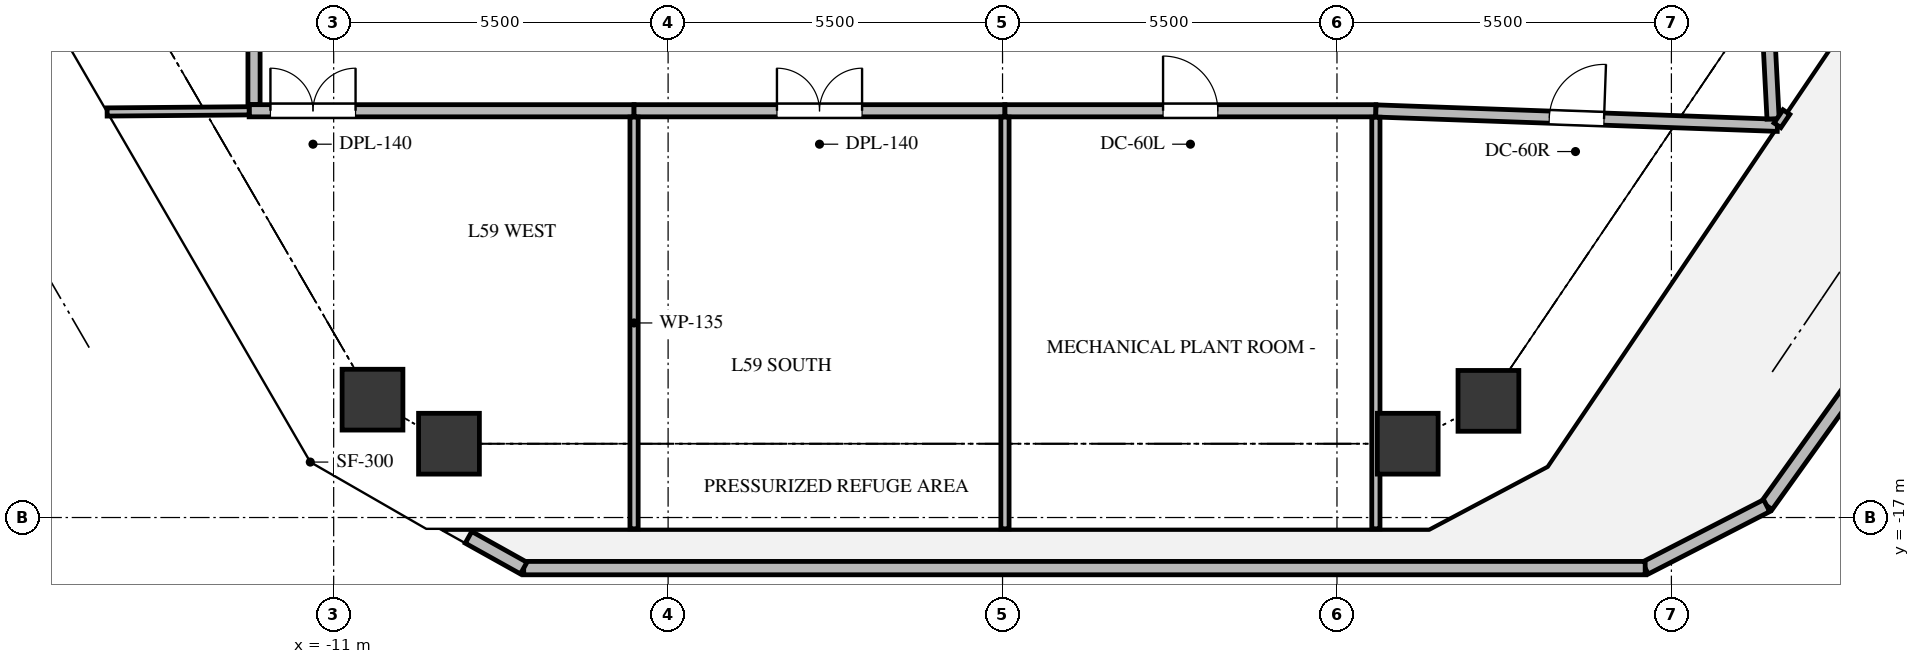
"""IFC4 building model, lengths in metres.
Left out: names, types, materials, properties, quantities, classifications, styles, units other than length and angle.
Written with IfcOpenShell. Run it as: python <this file> out.ifc"""

import sys

from ifc_helpers import new_model, si_unit, direction, frame, frame_2d, origin, origin_2d, place, context, subcontext, project, spatial, rectangle, extrude, source, transform, mapped, element, fill, save


model = new_model("IFC4")
c1 = context("Model", 3, precision=1e-05, world=origin(), true_north=direction((0.0, 1.0)))
c2 = subcontext(c1, "Body", "Model", "MODEL_VIEW")
j1 = project(units=[si_unit("LENGTHUNIT", "METRE"), si_unit("PLANEANGLEUNIT", "RADIAN")], contexts=[c1])
p1 = place(None, origin())
s1 = spatial("IfcSite", under=j1, at=p1, CompositionType="ELEMENT")
p2 = place(p1, origin())
s2 = spatial("IfcBuilding", under=s1, at=p2, CompositionType="ELEMENT")
p3 = place(p2, frame((0.0, 0.0, 213.4)))
s3 = spatial("IfcBuildingStorey", under=s2, at=p3, CompositionType="ELEMENT", Elevation=213.4)
m1 = source(origin(), c2, "Body", "SweptSolid", [
    extrude(rectangle(XDim=1.0, YDim=1.0, at=origin_2d()), origin(), (0.0, 0.0, 1.0), 4.96),
])
for number, where, z_axis, x_axis in (
    (1, (-10.361, -15.062, -0.3), (0.0, 0.0, 1.0), (1.0, 0.0, 0.0)),
    (2, (7.991, -15.081, -0.3), (0.0, 0.0, 1.0), (1.0, 0.0, 0.0)),
    (3, (6.664, -15.786, -0.3), (0.0, 0.0, 1.0), (1.0, 0.0, 0.0)),
    (4, (-9.104, -15.786, -0.3), (0.0, 0.0, 1.0), (1.0, 0.0, 0.0)),
):
    element("IfcColumn", number, at=place(p3, frame(where, z_axis=z_axis, x_axis=x_axis)), inside=s3, PredefinedType="COLUMN", context=c2, shape_type="MappedRepresentation", body=[
        mapped(m1, transform((0.0, 0.0, 0.0), x_axis=(1.0, 0.0, 0.0), y_axis=(0.0, 1.0, 0.0), z_axis=(0.0, 0.0, 1.0), scale=1.0)),
    ])
p4 = place(p3, frame((22.914, -2.353, 0.0), z_axis=(0.0, 0.0, 1.0), x_axis=(-0.582134397548, -0.813092579718, 0.0)))
e5 = element("IfcWall", 5, at=p4, inside=s3, PredefinedType="PARAPET", context=c2, shape_type="SweptSolid", body=[
    extrude(rectangle(XDim=17.774, YDim=0.22, at=frame_2d((8.887, 0.0))), origin(), (0.0, 0.0, 1.0), 1.2),
])
p5 = place(p3, frame((12.567, -16.805, 0.0), z_axis=(0.0, 0.0, 1.0), x_axis=(-0.889417810989, -0.457095129591, 0.0)))
e6 = element("IfcWall", 6, at=p5, inside=s3, PredefinedType="PARAPET", context=c2, shape_type="SweptSolid", body=[
    extrude(rectangle(XDim=2.247, YDim=0.22, at=frame_2d((1.124, 0.0))), origin(), (0.0, 0.0, 1.0), 1.2),
])
p6 = place(p3, frame((10.569, -17.832, 0.0), z_axis=(0.0, 0.0, 1.0), x_axis=(-1.0, 0.0, 0.0)))
e7 = element("IfcWall", 7, at=p6, inside=s3, PredefinedType="PARAPET", context=c2, shape_type="SweptSolid", body=[
    extrude(rectangle(XDim=18.443, YDim=0.22, at=frame_2d((9.222, 0.0))), origin(), (0.0, 0.0, 1.0), 1.2),
])
p7 = place(p3, frame((-7.875, -17.832, 0.0), z_axis=(0.0, 0.0, 1.0), x_axis=(-0.873358107893, 0.4870786542, 0.0)))
e8 = element("IfcWall", 8, at=p7, inside=s3, PredefinedType="PARAPET", context=c2, shape_type="SweptSolid", body=[
    extrude(rectangle(XDim=1.039, YDim=0.22, at=frame_2d((0.52, 0.0))), origin(), (0.0, 0.0, 1.0), 1.2),
])
p8 = place(p3, frame((-12.39, -10.31, 0.0), z_axis=(0.0, 0.0, 1.0), x_axis=(1.0, 0.0, 0.0)))
e9 = element("IfcWall", 9, at=p8, inside=s3, PredefinedType="SOLIDWALL", context=c2, shape_type="SweptSolid", body=[
    extrude(rectangle(XDim=6.33, YDim=0.2, at=frame_2d((3.165, 0.0))), origin(), (0.0, 0.0, 1.0), 4.645),
])
p9 = place(p8, frame((0.35, 0.0, 0.0)))
e10 = element("IfcOpeningElement", 10, at=p9, cuts=e9, PredefinedType="OPENING", context=c2, shape_type="SweptSolid", body=[
    extrude(rectangle(XDim=1.4, YDim=2.15, at=frame_2d((0.7, 1.075))), frame((0.0, 0.11, 0.0), z_axis=(0.0, -1.0, 0.0), x_axis=(1.0, 0.0, 0.0)), (0.0, 0.0, 1.0), 0.22),
])
p10 = place(p3, frame((-6.06, -10.31, 0.0), z_axis=(0.0, 0.0, 1.0), x_axis=(1.0, 0.0, 0.0)))
e11 = element("IfcWall", 11, at=p10, inside=s3, PredefinedType="SOLIDWALL", context=c2, shape_type="SweptSolid", body=[
    extrude(rectangle(XDim=6.1, YDim=0.2, at=frame_2d((3.05, 0.0))), origin(), (0.0, 0.0, 1.0), 3.901),
])
p11 = place(p10, frame((2.35, 0.0, 0.0)))
e12 = element("IfcOpeningElement", 12, at=p11, cuts=e11, PredefinedType="OPENING", context=c2, shape_type="SweptSolid", body=[
    extrude(rectangle(XDim=1.4, YDim=2.15, at=frame_2d((0.7, 1.075))), frame((0.0, 0.11, 0.0), z_axis=(0.0, -1.0, 0.0), x_axis=(1.0, 0.0, 0.0)), (0.0, 0.0, 1.0), 0.22),
])
p12 = place(p3, frame((0.04, -10.31, 0.0), z_axis=(0.0, 0.0, 1.0), x_axis=(1.0, 0.0, 0.0)))
e13 = element("IfcWall", 13, at=p12, inside=s3, PredefinedType="SOLIDWALL", context=c2, shape_type="SweptSolid", body=[
    extrude(rectangle(XDim=6.1, YDim=0.2, at=frame_2d((3.05, 0.0))), origin(), (0.0, 0.0, 1.0), 3.901),
])
p13 = place(p12, frame((2.6, 0.0, 0.0)))
e14 = element("IfcOpeningElement", 14, at=p13, cuts=e13, PredefinedType="OPENING", context=c2, shape_type="SweptSolid", body=[
    extrude(rectangle(XDim=0.9, YDim=2.05, at=frame_2d((0.45, 1.025))), frame((0.0, 0.11, 0.0), z_axis=(0.0, -1.0, 0.0), x_axis=(1.0, 0.0, 0.0)), (0.0, 0.0, 1.0), 0.22),
])
p14 = place(p3, frame((6.14, -10.313, 0.0), z_axis=(0.0, 0.0, 1.0), x_axis=(0.999359083983, -0.035796944861, 0.0)))
e15 = element("IfcWall", 15, at=p14, inside=s3, PredefinedType="SOLIDWALL", context=c2, shape_type="SweptSolid", body=[
    extrude(rectangle(XDim=6.609, YDim=0.2, at=frame_2d((3.304, 0.0))), origin(), (0.0, 0.0, 1.0), 3.999),
])
p15 = place(p14, frame((2.854, 0.0, 0.0)))
e16 = element("IfcOpeningElement", 16, at=p15, cuts=e15, PredefinedType="OPENING", context=c2, shape_type="SweptSolid", body=[
    extrude(rectangle(XDim=0.9, YDim=2.05, at=frame_2d((0.45, 1.025))), frame((0.0, 0.11, 0.0), z_axis=(0.0, -1.0, 0.0), x_axis=(1.0, 0.0, 0.0)), (0.0, 0.0, 1.0), 0.22),
])
p16 = place(p3, frame((12.672, -10.443, 0.0), z_axis=(0.0, 0.0, 1.0), x_axis=(-0.051412460162, 0.998677504974, 0.0)))
e17 = element("IfcWall", 17, at=p16, inside=s3, PredefinedType="SOLIDWALL", context=c2, shape_type="SweptSolid", body=[
    extrude(rectangle(XDim=7.042, YDim=0.2, at=frame_2d((3.521, 0.0))), origin(), (0.0, 0.0, 1.0), 3.999),
])
p17 = place(p16, frame((3.071, 0.0, 0.0)))
e18 = element("IfcOpeningElement", 18, at=p17, cuts=e17, PredefinedType="OPENING", context=c2, shape_type="SweptSolid", body=[
    extrude(rectangle(XDim=0.9, YDim=2.05, at=frame_2d((0.45, 1.025))), frame((0.0, 0.11, 0.0), z_axis=(0.0, -1.0, 0.0), x_axis=(1.0, 0.0, 0.0)), (0.0, 0.0, 1.0), 0.22),
])
p18 = place(p3, frame((-12.31, -3.41, 0.0), z_axis=(0.0, 0.0, 1.0), x_axis=(0.0, -1.0, 0.0)))
e19 = element("IfcWall", 19, at=p18, inside=s3, PredefinedType="SOLIDWALL", context=c2, shape_type="SweptSolid", body=[
    extrude(rectangle(XDim=6.796, YDim=0.2, at=frame_2d((3.398, 0.0))), origin(), (0.0, 0.0, 1.0), 4.645),
])
p19 = place(p18, frame((2.948, 0.0, 0.0)))
e20 = element("IfcOpeningElement", 20, at=p19, cuts=e19, PredefinedType="OPENING", context=c2, shape_type="SweptSolid", body=[
    extrude(rectangle(XDim=0.9, YDim=2.05, at=frame_2d((0.45, 1.025))), frame((0.0, 0.11, 0.0), z_axis=(0.0, -1.0, 0.0), x_axis=(1.0, 0.0, 0.0)), (0.0, 0.0, 1.0), 0.22),
])
p20 = place(p3, frame((-6.06, -10.414, 0.0), z_axis=(0.0, 0.0, 1.0), x_axis=(0.0, -1.0, 0.0)))
e21 = element("IfcWall", 21, at=p20, inside=s3, PredefinedType="PARTITIONING", context=c2, shape_type="SweptSolid", body=[
    extrude(rectangle(XDim=6.772, YDim=0.135, at=frame_2d((3.386, 0.0))), origin(), (0.0, 0.0, 1.0), 3.901),
])
p21 = place(p3, frame((-14.726, -10.33, 0.0), z_axis=(0.0, 0.0, 1.0), x_axis=(0.99996592241, 0.008255544766, 0.0)))
e22 = element("IfcWall", 22, at=p21, inside=s3, PredefinedType="PARTITIONING", context=c2, shape_type="SweptSolid", body=[
    extrude(rectangle(XDim=2.336, YDim=0.135, at=frame_2d((1.168, 0.0))), origin(), (0.0, 0.0, 1.0), 3.999),
])
p22 = place(p3, frame((0.04, -10.414, 0.0), z_axis=(0.0, 0.0, 1.0), x_axis=(0.0, -1.0, 0.0)))
e23 = element("IfcWall", 23, at=p22, inside=s3, PredefinedType="PARTITIONING", context=c2, shape_type="SweptSolid", body=[
    extrude(rectangle(XDim=6.772, YDim=0.135, at=frame_2d((3.386, 0.0))), origin(), (0.0, 0.0, 1.0), 3.999),
])
p23 = place(p3, frame((6.14, -10.417, 0.0), z_axis=(0.0, 0.0, 1.0), x_axis=(0.0, -1.0, 0.0)))
e24 = element("IfcWall", 24, at=p23, inside=s3, PredefinedType="PARTITIONING", context=c2, shape_type="SweptSolid", body=[
    extrude(rectangle(XDim=6.769, YDim=0.135, at=frame_2d((3.385, 0.0))), origin(), (0.0, 0.0, 1.0), 3.901),
])
p24 = place(p3, frame((12.744, -10.55, 0.0), z_axis=(0.0, 0.0, 1.0), x_axis=(0.56006489544, 0.828448738846, 0.0)))
e25 = element("IfcWall", 25, at=p24, inside=s3, PredefinedType="PARTITIONING", context=c2, shape_type="SweptSolid", body=[
    extrude(rectangle(XDim=0.262, YDim=0.135, at=frame_2d((0.131, 0.0))), origin(), (0.0, 0.0, 1.0), 4.645),
])
m2 = source(origin(), c2, "Body", "SweptSolid", [
    extrude(rectangle(XDim=1.4, YDim=2.15, at=frame_2d((0.7, 1.075))), frame((0.0, 0.025, 0.0), z_axis=(0.0, -1.0, 0.0), x_axis=(1.0, 0.0, 0.0)), (0.0, 0.0, 1.0), 0.05),
])
p25 = place(p9, origin())
e26 = element("IfcDoor", 26, at=p25, inside=s3, OperationType="DOUBLE_DOOR_SINGLE_SWING", PredefinedType="DOOR", context=c2, shape_type="MappedRepresentation", body=[
    mapped(m2, transform((0.0, 0.0, 0.0), x_axis=(1.0, 0.0, 0.0), y_axis=(0.0, 1.0, 0.0), z_axis=(0.0, 0.0, 1.0), scale=1.0)),
])
fill(e10, e26)
p26 = place(p11, origin())
e27 = element("IfcDoor", 27, at=p26, inside=s3, OperationType="DOUBLE_DOOR_SINGLE_SWING", PredefinedType="DOOR", context=c2, shape_type="MappedRepresentation", body=[
    mapped(m2, transform((0.0, 0.0, 0.0), x_axis=(1.0, 0.0, 0.0), y_axis=(0.0, 1.0, 0.0), z_axis=(0.0, 0.0, 1.0), scale=1.0)),
])
fill(e12, e27)
m3 = source(origin(), c2, "Body", "SweptSolid", [
    extrude(rectangle(XDim=0.9, YDim=2.05, at=frame_2d((0.45, 1.025))), frame((0.0, 0.025, 0.0), z_axis=(0.0, -1.0, 0.0), x_axis=(1.0, 0.0, 0.0)), (0.0, 0.0, 1.0), 0.05),
])
p27 = place(p13, origin())
e28 = element("IfcDoor", 28, at=p27, inside=s3, OperationType="SINGLE_SWING_LEFT", PredefinedType="DOOR", context=c2, shape_type="MappedRepresentation", body=[
    mapped(m3, transform((0.0, 0.0, 0.0), x_axis=(1.0, 0.0, 0.0), y_axis=(0.0, 1.0, 0.0), z_axis=(0.0, 0.0, 1.0), scale=1.0)),
])
fill(e14, e28)
m4 = source(origin(), c2, "Body", "SweptSolid", [
    extrude(rectangle(XDim=0.9, YDim=2.05, at=frame_2d((0.45, 1.025))), frame((0.0, 0.025, 0.0), z_axis=(0.0, -1.0, 0.0), x_axis=(1.0, 0.0, 0.0)), (0.0, 0.0, 1.0), 0.05),
])
p28 = place(p15, origin())
e29 = element("IfcDoor", 29, at=p28, inside=s3, OperationType="SINGLE_SWING_RIGHT", PredefinedType="DOOR", context=c2, shape_type="MappedRepresentation", body=[
    mapped(m4, transform((0.0, 0.0, 0.0), x_axis=(1.0, 0.0, 0.0), y_axis=(0.0, 1.0, 0.0), z_axis=(0.0, 0.0, 1.0), scale=1.0)),
])
fill(e16, e29)
save(model, sys.argv[1])
